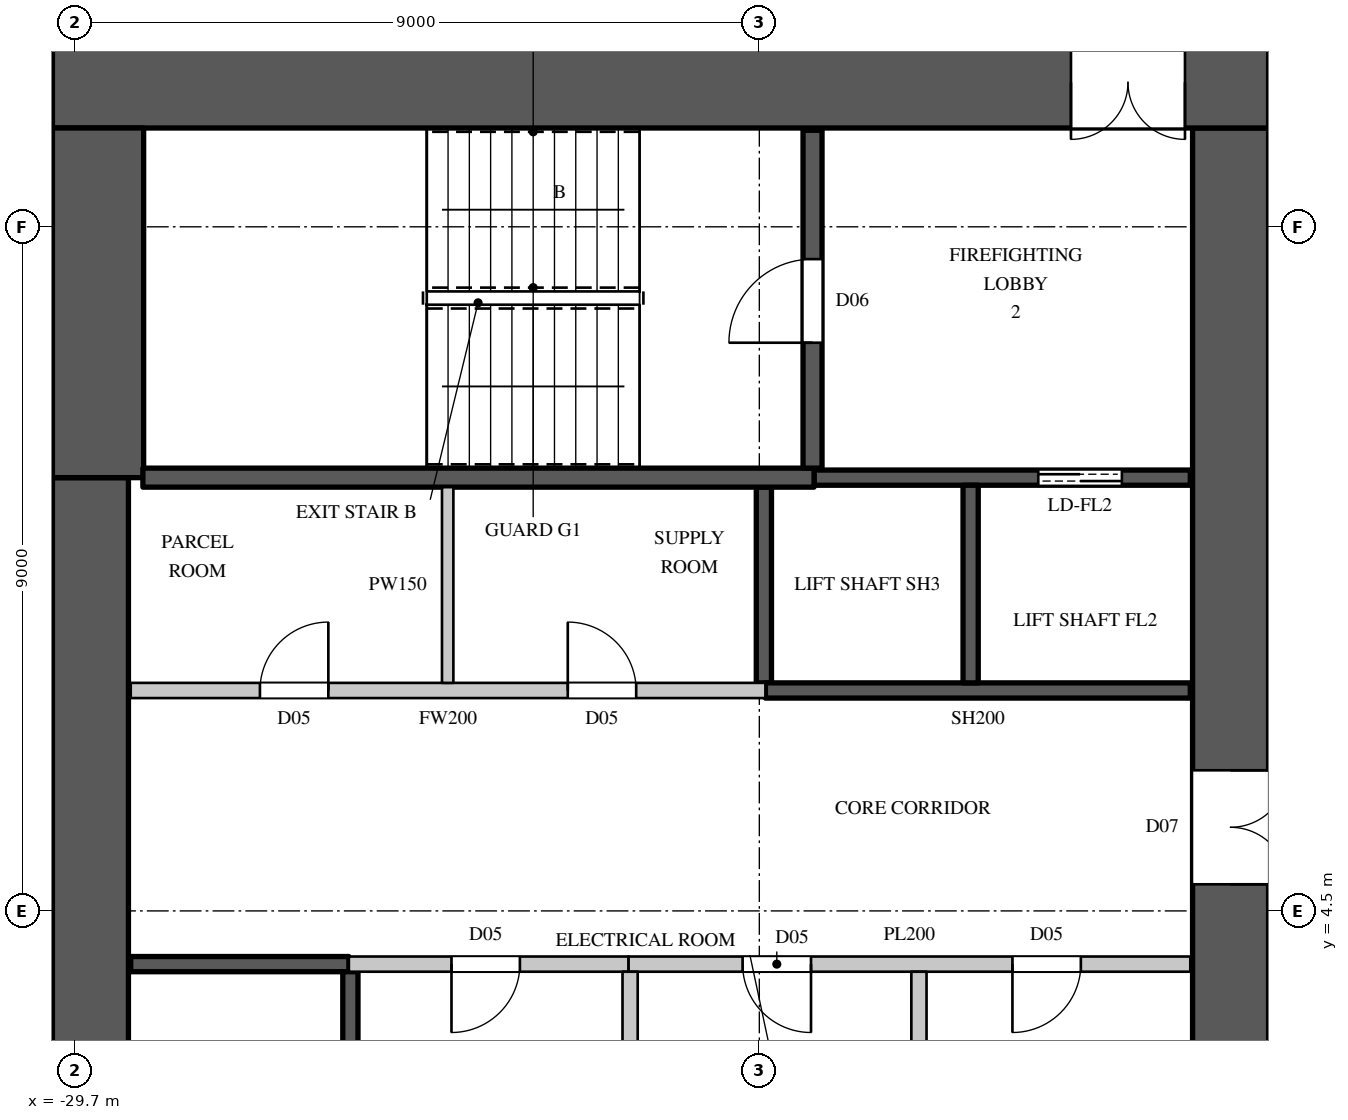
"""IFC4 building model, lengths in metres.
Left out: names, types, materials, properties, quantities, classifications, styles, units other than length and angle.
Written with IfcOpenShell. Run it as: python <this file> out.ifc"""

import sys

from ifc_helpers import new_model, si_unit, direction, frame, frame_2d, origin, place, context, subcontext, project, spatial, rectangle, extrude, element, fill, save


model = new_model("IFC4")
c1 = context("Model", 3, precision=1e-05, world=origin(), true_north=direction((0.0, 1.0)))
c2 = subcontext(c1, "Body", "Model", "MODEL_VIEW")
j1 = project(units=[si_unit("LENGTHUNIT", "METRE"), si_unit("PLANEANGLEUNIT", "RADIAN")], contexts=[c1])
p1 = place(None, origin())
s1 = spatial("IfcSite", under=j1, at=p1, CompositionType="ELEMENT")
p2 = place(p1, origin())
s2 = spatial("IfcBuilding", under=s1, at=p2, CompositionType="ELEMENT")
p3 = place(p2, frame((0.0, 0.0, 131.1)))
s3 = spatial("IfcBuildingStorey", under=s2, at=p3, CompositionType="ELEMENT", Elevation=131.1)
p4 = place(p3, frame((-30.0, 15.4, 0.0), z_axis=(0.0, 0.0, 1.0), x_axis=(1.0, 0.0, 0.0)))
e1 = element("IfcWall", 1, at=p4, inside=s3, PredefinedType="SHEAR", context=c2, shape_type="SweptSolid", body=[
    extrude(rectangle(XDim=16.0, YDim=1.2, at=frame_2d((8.0, 0.0))), origin(), (0.0, 0.0, 1.0), 3.6),
])
p5 = place(p4, frame((13.4, 0.0, 0.0)))
e2 = element("IfcOpeningElement", 2, at=p5, cuts=e1, PredefinedType="OPENING", context=c2, shape_type="SweptSolid", body=[
    extrude(rectangle(XDim=1.5, YDim=2.4, at=frame_2d((0.75, 1.2))), frame((0.0, 0.61, 0.0), z_axis=(0.0, -1.0, 0.0), x_axis=(1.0, 0.0, 0.0)), (0.0, 0.0, 1.0), 1.22),
])
p6 = place(p3, frame((-14.5, -14.8, 0.0), z_axis=(0.0, 0.0, 1.0), x_axis=(0.0, 1.0, 0.0)))
e3 = element("IfcWall", 3, at=p6, inside=s3, PredefinedType="SHEAR", context=c2, shape_type="SweptSolid", body=[
    extrude(rectangle(XDim=29.6, YDim=1.0, at=frame_2d((14.8, 0.0))), origin(), (0.0, 0.0, 1.0), 3.6),
])
p7 = place(p6, frame((8.45, 0.0, 0.0)))
e4 = element("IfcOpeningElement", 4, at=p7, cuts=e3, PredefinedType="OPENING", context=c2, shape_type="SweptSolid", body=[
    extrude(rectangle(XDim=1.5, YDim=2.4, at=frame_2d((0.75, 1.2))), frame((0.0, 0.51, 0.0), z_axis=(0.0, -1.0, 0.0), x_axis=(1.0, 0.0, 0.0)), (0.0, 0.0, 1.0), 1.02),
])
p8 = place(p6, frame((19.65, 0.0, 0.0)))
e5 = element("IfcOpeningElement", 5, at=p8, cuts=e3, PredefinedType="OPENING", context=c2, shape_type="SweptSolid", body=[
    extrude(rectangle(XDim=1.5, YDim=2.4, at=frame_2d((0.75, 1.2))), frame((0.0, 0.51, 0.0), z_axis=(0.0, -1.0, 0.0), x_axis=(1.0, 0.0, 0.0)), (0.0, 0.0, 1.0), 1.02),
])
p9 = place(p6, frame((14.5, 0.0, 0.0)))
e6 = element("IfcOpeningElement", 6, at=p9, cuts=e3, PredefinedType="OPENING", context=c2, shape_type="SweptSolid", body=[
    extrude(rectangle(XDim=0.6, YDim=2.0, at=frame_2d((0.3, 1.0))), frame((0.0, 0.51, 0.0), z_axis=(0.0, -1.0, 0.0), x_axis=(1.0, 0.0, 0.0)), (0.0, 0.0, 1.0), 1.02),
])
p10 = place(p3, frame((-29.5, -10.2, 0.0), z_axis=(0.0, 0.0, 1.0), x_axis=(0.0, 1.0, 0.0)))
e7 = element("IfcWall", 7, at=p10, inside=s3, PredefinedType="SHEAR", context=c2, shape_type="SweptSolid", body=[
    extrude(rectangle(XDim=20.4, YDim=1.0, at=frame_2d((10.2, 0.0))), origin(), (0.0, 0.0, 1.0), 3.6),
])
p11 = place(p3, frame((-29.4, 10.2, 0.0), z_axis=(0.0, 0.0, 1.0), x_axis=(0.0, 1.0, 0.0)))
e8 = element("IfcWall", 8, at=p11, inside=s3, PredefinedType="SHEAR", context=c2, shape_type="SweptSolid", body=[
    extrude(rectangle(XDim=4.6, YDim=1.2, at=frame_2d((2.3, 0.0))), origin(), (0.0, 0.0, 1.0), 3.6),
])
p12 = place(p3, frame((-28.97, 7.4, 0.0), z_axis=(0.0, 0.0, 1.0), x_axis=(1.0, 0.0, 0.0)))
e9 = element("IfcWall", 9, at=p12, inside=s3, PredefinedType="PARTITIONING", context=c2, shape_type="SweptSolid", body=[
    extrude(rectangle(XDim=8.35, YDim=0.2, at=frame_2d((4.175, 0.0))), origin(), (0.0, 0.0, 1.0), 3.3),
])
p13 = place(p12, frame((1.7, 0.0, 0.0)))
e10 = element("IfcOpeningElement", 10, at=p13, cuts=e9, PredefinedType="OPENING", context=c2, shape_type="SweptSolid", body=[
    extrude(rectangle(XDim=0.9, YDim=2.2, at=frame_2d((0.45, 1.1))), frame((0.0, 0.11, 0.0), z_axis=(0.0, -1.0, 0.0), x_axis=(1.0, 0.0, 0.0)), (0.0, 0.0, 1.0), 0.22),
])
p14 = place(p12, frame((5.75, 0.0, 0.0)))
e11 = element("IfcOpeningElement", 11, at=p14, cuts=e9, PredefinedType="OPENING", context=c2, shape_type="SweptSolid", body=[
    extrude(rectangle(XDim=0.9, YDim=2.2, at=frame_2d((0.45, 1.1))), frame((0.0, 0.11, 0.0), z_axis=(0.0, -1.0, 0.0), x_axis=(1.0, 0.0, 0.0)), (0.0, 0.0, 1.0), 0.22),
])
p15 = place(p3, frame((-26.1, 3.8, 0.0), z_axis=(0.0, 0.0, 1.0), x_axis=(1.0, 0.0, 0.0)))
e12 = element("IfcWall", 12, at=p15, inside=s3, PredefinedType="PARTITIONING", context=c2, shape_type="SweptSolid", body=[
    extrude(rectangle(XDim=3.68, YDim=0.2, at=frame_2d((1.84, 0.0))), origin(), (0.0, 0.0, 1.0), 3.3),
])
p16 = place(p15, frame((1.35, 0.0, 0.0)))
e13 = element("IfcOpeningElement", 13, at=p16, cuts=e12, PredefinedType="OPENING", context=c2, shape_type="SweptSolid", body=[
    extrude(rectangle(XDim=0.9, YDim=2.2, at=frame_2d((0.45, 1.1))), frame((0.0, 0.11, 0.0), z_axis=(0.0, -1.0, 0.0), x_axis=(1.0, 0.0, 0.0)), (0.0, 0.0, 1.0), 0.22),
])
p17 = place(p3, frame((-24.8, 7.5, 0.0), z_axis=(0.0, 0.0, 1.0), x_axis=(0.0, 1.0, 0.0)))
e14 = element("IfcWall", 14, at=p17, inside=s3, PredefinedType="PARTITIONING", context=c2, shape_type="SweptSolid", body=[
    extrude(rectangle(XDim=2.575, YDim=0.15, at=frame_2d((1.288, 0.0))), origin(), (0.0, 0.0, 1.0), 3.3),
])
p18 = place(p3, frame((-22.42, 3.8, 0.0), z_axis=(0.0, 0.0, 1.0), x_axis=(1.0, 0.0, 0.0)))
e15 = element("IfcWall", 15, at=p18, inside=s3, PredefinedType="PARTITIONING", context=c2, shape_type="SweptSolid", body=[
    extrude(rectangle(XDim=7.39, YDim=0.2, at=frame_2d((3.695, 0.0))), origin(), (0.0, 0.0, 1.0), 3.3),
])
p19 = place(p18, frame((1.5, 0.0, 0.0)))
e16 = element("IfcOpeningElement", 16, at=p19, cuts=e15, PredefinedType="OPENING", context=c2, shape_type="SweptSolid", body=[
    extrude(rectangle(XDim=0.9, YDim=2.2, at=frame_2d((0.45, 1.1))), frame((0.0, 0.11, 0.0), z_axis=(0.0, -1.0, 0.0), x_axis=(1.0, 0.0, 0.0)), (0.0, 0.0, 1.0), 0.22),
])
p20 = place(p18, frame((5.05, 0.0, 0.0)))
e17 = element("IfcOpeningElement", 17, at=p20, cuts=e15, PredefinedType="OPENING", context=c2, shape_type="SweptSolid", body=[
    extrude(rectangle(XDim=0.9, YDim=2.2, at=frame_2d((0.45, 1.1))), frame((0.0, 0.11, 0.0), z_axis=(0.0, -1.0, 0.0), x_axis=(1.0, 0.0, 0.0)), (0.0, 0.0, 1.0), 0.22),
])
for number, where, z_axis, x_axis in (
    (18, (-22.4, 1.1, 0.0), (0.0, 0.0, 1.0), (0.0, 1.0, 0.0)),
    (19, (-18.6, 1.1, 0.0), (0.0, 0.0, 1.0), (0.0, 1.0, 0.0)),
):
    element("IfcWall", number, at=place(p3, frame(where, z_axis=z_axis, x_axis=x_axis)), inside=s3, PredefinedType="PARTITIONING", context=c2, shape_type="SweptSolid", body=[
        extrude(rectangle(XDim=2.6, YDim=0.2, at=frame_2d((1.3, 0.0))), origin(), (0.0, 0.0, 1.0), 3.3),
    ])
p21 = place(p3, frame((-28.97, 3.8, 0.0), z_axis=(0.0, 0.0, 1.0), x_axis=(1.0, 0.0, 0.0)))
e20 = element("IfcWall", 20, at=p21, inside=s3, PredefinedType="SHEAR", context=c2, shape_type="SweptSolid", body=[
    extrude(rectangle(XDim=2.87, YDim=0.2, at=frame_2d((1.435, 0.0))), origin(), (0.0, 0.0, 1.0), 3.3),
])
p22 = place(p3, frame((-26.08, 1.1, 0.0), z_axis=(0.0, 0.0, 1.0), x_axis=(0.0, 1.0, 0.0)))
e21 = element("IfcWall", 21, at=p22, inside=s3, PredefinedType="SHEAR", context=c2, shape_type="SweptSolid", body=[
    extrude(rectangle(XDim=2.6, YDim=0.2, at=frame_2d((1.3, 0.0))), origin(), (0.0, 0.0, 1.0), 3.3),
])
p23 = place(p3, frame((-20.64, 7.5, 0.0), z_axis=(0.0, 0.0, 1.0), x_axis=(0.0, 1.0, 0.0)))
e22 = element("IfcWall", 22, at=p23, inside=s3, PredefinedType="SHEAR", context=c2, shape_type="SweptSolid", body=[
    extrude(rectangle(XDim=2.575, YDim=0.2, at=frame_2d((1.288, 0.0))), origin(), (0.0, 0.0, 1.0), 3.3),
])
p24 = place(p3, frame((-20.62, 7.4, 0.0), z_axis=(0.0, 0.0, 1.0), x_axis=(1.0, 0.0, 0.0)))
e23 = element("IfcWall", 23, at=p24, inside=s3, PredefinedType="SHEAR", context=c2, shape_type="SweptSolid", body=[
    extrude(rectangle(XDim=5.59, YDim=0.2, at=frame_2d((2.795, 0.0))), origin(), (0.0, 0.0, 1.0), 3.3),
])
p25 = place(p3, frame((-19.98, 10.2, 0.0), z_axis=(0.0, 0.0, 1.0), x_axis=(1.0, 0.0, 0.0)))
e24 = element("IfcWall", 24, at=p25, inside=s3, PredefinedType="SHEAR", context=c2, shape_type="SweptSolid", body=[
    extrude(rectangle(XDim=4.95, YDim=0.2, at=frame_2d((2.475, 0.0))), origin(), (0.0, 0.0, 1.0), 3.3),
])
p26 = place(p25, frame((2.95, 0.0, 0.0)))
e25 = element("IfcOpeningElement", 25, at=p26, cuts=e24, PredefinedType="OPENING", context=c2, shape_type="SweptSolid", body=[
    extrude(rectangle(XDim=1.1, YDim=2.2, at=frame_2d((0.55, 1.1))), frame((0.0, 0.11, 0.0), z_axis=(0.0, -1.0, 0.0), x_axis=(1.0, 0.0, 0.0)), (0.0, 0.0, 1.0), 0.22),
])
p27 = place(p3, frame((-17.92, 7.5, 0.0), z_axis=(0.0, 0.0, 1.0), x_axis=(0.0, 1.0, 0.0)))
e26 = element("IfcWall", 26, at=p27, inside=s3, PredefinedType="SHEAR", context=c2, shape_type="SweptSolid", body=[
    extrude(rectangle(XDim=2.6, YDim=0.2, at=frame_2d((1.3, 0.0))), origin(), (0.0, 0.0, 1.0), 3.6),
])
p28 = place(p3, frame((-28.81, 10.2, 0.0), z_axis=(0.0, 0.0, 1.0), x_axis=(1.0, 0.0, 0.0)))
e27 = element("IfcWall", 27, at=p28, inside=s3, PredefinedType="SHEAR", context=c2, shape_type="SweptSolid", body=[
    extrude(rectangle(XDim=8.83, YDim=0.25, at=frame_2d((4.415, 0.0))), origin(), (0.0, 0.0, 1.0), 3.3),
])
p29 = place(p3, frame((-20.0, 10.325, 0.0), z_axis=(0.0, 0.0, 1.0), x_axis=(0.0, 1.0, 0.0)))
e28 = element("IfcWall", 28, at=p29, inside=s3, PredefinedType="SHEAR", context=c2, shape_type="SweptSolid", body=[
    extrude(rectangle(XDim=4.445, YDim=0.25, at=frame_2d((2.223, 0.0))), origin(), (0.0, 0.0, 1.0), 3.3),
])
p30 = place(p29, frame((1.65, 0.0, 0.0)))
e29 = element("IfcOpeningElement", 29, at=p30, cuts=e28, PredefinedType="OPENING", context=c2, shape_type="SweptSolid", body=[
    extrude(rectangle(XDim=1.1, YDim=2.2, at=frame_2d((0.55, 1.1))), frame((0.0, 0.135, 0.0), z_axis=(0.0, -1.0, 0.0), x_axis=(1.0, 0.0, 0.0)), (0.0, 0.0, 1.0), 0.27),
])
p31 = place(p30, origin())
e30 = element("IfcDoor", 30, at=p31, inside=s3, OperationType="SINGLE_SWING_LEFT", PredefinedType="DOOR", context=c2, shape_type="SweptSolid", body=[
    extrude(rectangle(XDim=1.1, YDim=2.2, at=frame_2d((0.55, 1.1))), frame((0.0, 0.025, 0.0), z_axis=(0.0, -1.0, 0.0), x_axis=(1.0, 0.0, 0.0)), (0.0, 0.0, 1.0), 0.05),
])
fill(e29, e30)
p32 = place(p16, origin())
e31 = element("IfcDoor", 31, at=p32, inside=s3, OperationType="SINGLE_SWING_RIGHT", PredefinedType="DOOR", context=c2, shape_type="SweptSolid", body=[
    extrude(rectangle(XDim=0.9, YDim=2.2, at=frame_2d((0.45, 1.1))), frame((0.0, 0.025, 0.0), z_axis=(0.0, -1.0, 0.0), x_axis=(1.0, 0.0, 0.0)), (0.0, 0.0, 1.0), 0.05),
])
fill(e13, e31)
p33 = place(p19, origin())
e32 = element("IfcDoor", 32, at=p33, inside=s3, OperationType="SINGLE_SWING_LEFT", PredefinedType="DOOR", context=c2, shape_type="SweptSolid", body=[
    extrude(rectangle(XDim=0.9, YDim=2.2, at=frame_2d((0.45, 1.1))), frame((0.0, 0.025, 0.0), z_axis=(0.0, -1.0, 0.0), x_axis=(1.0, 0.0, 0.0)), (0.0, 0.0, 1.0), 0.05),
])
fill(e16, e32)
p34 = place(p20, origin())
e33 = element("IfcDoor", 33, at=p34, inside=s3, OperationType="SINGLE_SWING_RIGHT", PredefinedType="DOOR", context=c2, shape_type="SweptSolid", body=[
    extrude(rectangle(XDim=0.9, YDim=2.2, at=frame_2d((0.45, 1.1))), frame((0.0, 0.025, 0.0), z_axis=(0.0, -1.0, 0.0), x_axis=(1.0, 0.0, 0.0)), (0.0, 0.0, 1.0), 0.05),
])
fill(e17, e33)
p35 = place(p13, origin())
e34 = element("IfcDoor", 34, at=p35, inside=s3, OperationType="SINGLE_SWING_RIGHT", PredefinedType="DOOR", context=c2, shape_type="SweptSolid", body=[
    extrude(rectangle(XDim=0.9, YDim=2.2, at=frame_2d((0.45, 1.1))), frame((0.0, 0.025, 0.0), z_axis=(0.0, -1.0, 0.0), x_axis=(1.0, 0.0, 0.0)), (0.0, 0.0, 1.0), 0.05),
])
fill(e10, e34)
p36 = place(p14, origin())
e35 = element("IfcDoor", 35, at=p36, inside=s3, OperationType="SINGLE_SWING_LEFT", PredefinedType="DOOR", context=c2, shape_type="SweptSolid", body=[
    extrude(rectangle(XDim=0.9, YDim=2.2, at=frame_2d((0.45, 1.1))), frame((0.0, 0.025, 0.0), z_axis=(0.0, -1.0, 0.0), x_axis=(1.0, 0.0, 0.0)), (0.0, 0.0, 1.0), 0.05),
])
fill(e11, e35)
p37 = place(p26, origin())
e36 = element("IfcDoor", 36, at=p37, inside=s3, OperationType="DOUBLE_DOOR_SLIDING", PredefinedType="DOOR", context=c2, shape_type="SweptSolid", body=[
    extrude(rectangle(XDim=1.1, YDim=2.2, at=frame_2d((0.55, 1.1))), frame((0.0, 0.025, 0.0), z_axis=(0.0, -1.0, 0.0), x_axis=(1.0, 0.0, 0.0)), (0.0, 0.0, 1.0), 0.05),
])
fill(e25, e36)
p38 = place(p5, origin())
e37 = element("IfcDoor", 37, at=p38, inside=s3, OperationType="DOUBLE_DOOR_SINGLE_SWING", PredefinedType="DOOR", context=c2, shape_type="SweptSolid", body=[
    extrude(rectangle(XDim=1.5, YDim=2.4, at=frame_2d((0.75, 1.2))), frame((0.0, 0.025, 0.0), z_axis=(0.0, -1.0, 0.0), x_axis=(1.0, 0.0, 0.0)), (0.0, 0.0, 1.0), 0.05),
])
fill(e2, e37)
p39 = place(p8, origin())
e38 = element("IfcDoor", 38, at=p39, inside=s3, OperationType="DOUBLE_DOOR_SINGLE_SWING", PredefinedType="DOOR", context=c2, shape_type="SweptSolid", body=[
    extrude(rectangle(XDim=1.5, YDim=2.4, at=frame_2d((0.75, 1.2))), frame((0.0, -0.445, 0.0), z_axis=(0.0, -1.0, 0.0), x_axis=(1.0, 0.0, 0.0)), (0.0, 0.0, 1.0), 0.05),
])
fill(e5, e38)
save(model, sys.argv[1])
